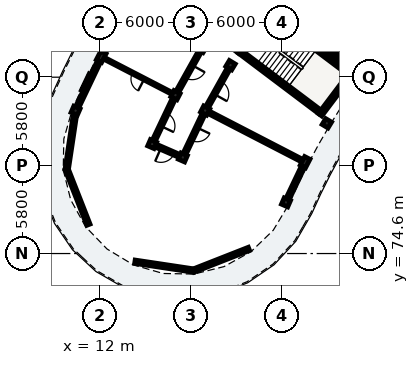
"""IFC4 building model, lengths in metres.
Left out: names, types, materials, properties, quantities, classifications, styles, units other than length and angle.
Written with IfcOpenShell. Run it as: python <this file> out.ifc"""

import sys

from ifc_helpers import new_model, si_unit, direction, frame, frame_2d, origin, origin_2d, place, context, subcontext, project, spatial, rectangle, extrude, element, fill, save


model = new_model("IFC4")
c1 = context("Model", 3, precision=1e-05, world=origin(), true_north=direction((0.0, 1.0)))
c2 = subcontext(c1, "Body", "Model", "MODEL_VIEW")
j1 = project(units=[si_unit("LENGTHUNIT", "METRE"), si_unit("PLANEANGLEUNIT", "RADIAN")], contexts=[c1])
p1 = place(None, origin())
s1 = spatial("IfcSite", under=j1, at=p1, CompositionType="ELEMENT")
p2 = place(p1, origin())
s2 = spatial("IfcBuilding", under=s1, at=p2, CompositionType="ELEMENT")
p3 = place(p2, frame((0.0, 0.0, 42.44)))
s3 = spatial("IfcBuildingStorey", under=s2, at=p3, CompositionType="ELEMENT", Elevation=42.44)
p4 = place(p3, frame((21.199, 87.897, 0.0), z_axis=(0.0, 0.0, 1.0), x_axis=(0.798639633744, -0.601809550782, 0.0)))
e1 = element("IfcWall", 1, at=p4, inside=s3, PredefinedType="SHEAR", context=c2, shape_type="SweptSolid", body=[
    extrude(rectangle(XDim=6.6, YDim=0.28, at=frame_2d((3.3, 0.0))), origin(), (0.0, 0.0, 1.0), 3.11),
])
for number, where, z_axis, x_axis in (
    (2, (26.497, 83.729, 0.0), (0.0, 0.0, 1.0), (0.602, 0.799, 0.0)),
    (3, (21.003, 87.87, 0.0), (0.0, 0.0, 1.0), (0.602, 0.799, 0.0)),
):
    element("IfcWall", number, at=place(p3, frame(where, z_axis=z_axis, x_axis=x_axis)), inside=s3, PredefinedType="SHEAR", context=c2, shape_type="SweptSolid", body=[
        extrude(rectangle(XDim=3.48, YDim=0.28, at=frame_2d((1.74, 0.0))), origin(), (0.0, 0.0, 1.0), 3.11),
    ])
p5 = place(p3, frame((23.125, 90.453, 0.0), z_axis=(0.0, 0.0, 1.0), x_axis=(0.798639633744, -0.601809550782, 0.0)))
e4 = element("IfcWall", 4, at=p5, inside=s3, PredefinedType="SHEAR", context=c2, shape_type="SweptSolid", body=[
    extrude(rectangle(XDim=6.6, YDim=0.28, at=frame_2d((3.3, 0.0))), origin(), (0.0, 0.0, 1.0), 3.11),
])
p6 = place(p5, frame((0.22, 0.0, 0.0)))
e5 = element("IfcOpeningElement", 5, at=p6, cuts=e4, PredefinedType="OPENING", context=c2, shape_type="SweptSolid", body=[
    extrude(rectangle(XDim=1.05, YDim=2.15, at=frame_2d((0.525, 1.075))), frame((0.0, 0.15, 0.0), z_axis=(0.0, -1.0, 0.0), x_axis=(1.0, 0.0, 0.0)), (0.0, 0.0, 1.0), 0.3),
])
p7 = place(p3, frame((26.455, 88.476, 0.0), z_axis=(0.0, 0.0, 1.0), x_axis=(0.798608971494, -0.601850239387, 0.0)))
e6 = element("IfcWall", 6, at=p7, inside=s3, PredefinedType="SHEAR", context=c2, shape_type="SweptSolid", body=[
    extrude(rectangle(XDim=2.7, YDim=0.23, at=frame_2d((1.35, 0.0))), origin(), (0.0, 0.0, 1.0), 3.11),
])
for number, where, z_axis, x_axis in (
    (7, (26.943, 83.167, 0.0), (0.0, 0.0, 1.0), (-0.856, 0.517, 0.0)),
    (8, (20.608, 86.991, 0.0), (0.0, 0.0, 1.0), (-0.856, 0.517, 0.0)),
    (9, (18.724, 88.128, 0.0), (0.0, 0.0, 1.0), (-0.856, 0.517, 0.0)),
):
    element("IfcColumn", number, at=place(p3, frame(where, z_axis=z_axis, x_axis=x_axis)), inside=s3, PredefinedType="COLUMN", context=c2, shape_type="SweptSolid", body=[
        extrude(rectangle(XDim=0.45, YDim=0.45, at=origin_2d()), origin(), (0.0, 0.0, 1.0), 3.12),
    ])
p8 = place(p3, frame((25.513, 80.61, 0.0), z_axis=(0.0, 0.0, 1.0), x_axis=(-0.888350277506, 0.459166401705, 0.0)))
e10 = element("IfcColumn", 10, at=p8, inside=s3, PredefinedType="PILASTER", context=c2, shape_type="SweptSolid", body=[
    extrude(rectangle(XDim=0.39, YDim=0.63, at=origin_2d()), origin(), (0.0, 0.0, 1.0), 3.12),
])
for number, where, z_axis, x_axis in (
    (11, (18.939, 84.008, 0.0), (0.0, 0.0, 1.0), (-0.888, 0.459, 0.0)),
    (12, (16.985, 85.018, 0.0), (0.0, 0.0, 1.0), (-0.888, 0.459, 0.0)),
):
    element("IfcColumn", number, at=place(p3, frame(where, z_axis=z_axis, x_axis=x_axis)), inside=s3, PredefinedType="COLUMN", context=c2, shape_type="SweptSolid", body=[
        extrude(rectangle(XDim=0.45, YDim=0.45, at=origin_2d()), origin(), (0.0, 0.0, 1.0), 3.12),
    ])
p9 = place(p3, frame((12.099, 87.543, 0.0), z_axis=(0.0, 0.0, 1.0), x_axis=(-0.888350277506, 0.459166401705, 0.0)))
e13 = element("IfcColumn", 13, at=p9, inside=s3, PredefinedType="PILASTER", context=c2, shape_type="SweptSolid", body=[
    extrude(rectangle(XDim=0.39, YDim=0.63, at=origin_2d()), origin(), (0.0, 0.0, 1.0), 3.12),
])
for number, where, z_axis, x_axis in (
    (14, (24.254, 77.964, 0.0), (0.0, 0.0, 1.0), (-0.917, 0.4, 0.0)),
    (15, (17.47, 80.921, 0.0), (0.0, 0.0, 1.0), (-0.917, 0.4, 0.0)),
    (16, (15.454, 81.801, 0.0), (0.0, 0.0, 1.0), (-0.917, 0.4, 0.0)),
    (17, (10.412, 83.999, 0.0), (0.0, 0.0, 1.0), (-0.917, 0.4, 0.0)),
):
    element("IfcColumn", number, at=place(p3, frame(where, z_axis=z_axis, x_axis=x_axis)), inside=s3, PredefinedType="COLUMN", context=c2, shape_type="SweptSolid", body=[
        extrude(rectangle(XDim=0.45, YDim=0.45, at=origin_2d()), origin(), (0.0, 0.0, 1.0), 3.12),
    ])
p10 = place(p3, frame((13.92, 90.799, 0.0), z_axis=(0.0, 0.0, 1.0), x_axis=(-0.488221804534, -0.872719582442, 0.0)))
e18 = element("IfcWall", 18, at=p10, inside=s3, PredefinedType="SOLIDWALL", context=c2, shape_type="SweptSolid", body=[
    extrude(rectangle(XDim=3.566, YDim=0.225, at=frame_2d((1.783, 0.0))), origin(), (0.0, 0.0, 1.0), 2.355),
])
p11 = place(p10, frame((1.043, 0.0, 0.55)))
e19 = element("IfcOpeningElement", 19, at=p11, cuts=e18, PredefinedType="OPENING", context=c2, shape_type="SweptSolid", body=[
    extrude(rectangle(XDim=1.48, YDim=1.62, at=frame_2d((0.74, 0.81))), frame((0.0, 0.123, 0.0), z_axis=(0.0, -1.0, 0.0), x_axis=(1.0, 0.0, 0.0)), (0.0, 0.0, 1.0), 0.245),
])
p12 = place(p3, frame((12.028, 87.394, 0.0), z_axis=(0.0, 0.0, 1.0), x_axis=(-0.429654487413, -0.902993367332, 0.0)))
e20 = element("IfcWall", 20, at=p12, inside=s3, PredefinedType="SOLIDWALL", context=c2, shape_type="SweptSolid", body=[
    extrude(rectangle(XDim=3.566, YDim=0.225, at=frame_2d((1.783, 0.0))), origin(), (0.0, 0.0, 1.0), 2.355),
])
p13 = place(p12, frame((1.183, 0.0, 0.55)))
e21 = element("IfcOpeningElement", 21, at=p13, cuts=e20, PredefinedType="OPENING", context=c2, shape_type="SweptSolid", body=[
    extrude(rectangle(XDim=1.2, YDim=1.51, at=frame_2d((0.6, 0.755))), frame((0.0, 0.123, 0.0), z_axis=(0.0, -1.0, 0.0), x_axis=(1.0, 0.0, 0.0)), (0.0, 0.0, 1.0), 0.245),
])
p14 = place(p3, frame((25.442, 80.461, 0.0), z_axis=(0.0, 0.0, 1.0), x_axis=(-0.429612784627, -0.90301320881, 0.0)))
e22 = element("IfcWall", 22, at=p14, inside=s3, PredefinedType="SOLIDWALL", context=c2, shape_type="SweptSolid", body=[
    extrude(rectangle(XDim=2.57, YDim=0.225, at=frame_2d((1.285, 0.0))), origin(), (0.0, 0.0, 1.0), 2.355),
])
p15 = place(p14, frame((0.545, 0.0, 0.55)))
e23 = element("IfcOpeningElement", 23, at=p15, cuts=e22, PredefinedType="OPENING", context=c2, shape_type="SweptSolid", body=[
    extrude(rectangle(XDim=1.48, YDim=1.46, at=frame_2d((0.74, 0.73))), frame((0.0, 0.123, 0.0), z_axis=(0.0, -1.0, 0.0), x_axis=(1.0, 0.0, 0.0)), (0.0, 0.0, 1.0), 0.245),
])
p16 = place(p3, frame((21.818, 74.908, 0.0), z_axis=(0.0, 0.0, 1.0), x_axis=(-0.930784898276, -0.365567330517, 0.0)))
e24 = element("IfcWall", 24, at=p16, inside=s3, PredefinedType="SOLIDWALL", context=c2, shape_type="SweptSolid", body=[
    extrude(rectangle(XDim=3.908, YDim=0.225, at=frame_2d((1.954, 0.0))), origin(), (0.0, 0.0, 1.0), 2.355),
])
p17 = place(p16, frame((0.979, 0.0, 0.4)))
e25 = element("IfcOpeningElement", 25, at=p17, cuts=e24, PredefinedType="OPENING", context=c2, shape_type="SweptSolid", body=[
    extrude(rectangle(XDim=1.95, YDim=1.78, at=frame_2d((0.975, 0.89))), frame((0.0, 0.123, 0.0), z_axis=(0.0, -1.0, 0.0), x_axis=(1.0, 0.0, 0.0)), (0.0, 0.0, 1.0), 0.245),
])
p18 = place(p3, frame((18.18, 73.479, 0.0), z_axis=(0.0, 0.0, 1.0), x_axis=(-0.988876706576, 0.148737551381, 0.0)))
e26 = element("IfcWall", 26, at=p18, inside=s3, PredefinedType="SOLIDWALL", context=c2, shape_type="SweptSolid", body=[
    extrude(rectangle(XDim=3.908, YDim=0.225, at=frame_2d((1.954, 0.0))), origin(), (0.0, 0.0, 1.0), 2.355),
])
p19 = place(p3, frame((11.26, 76.496, 0.0), z_axis=(0.0, 0.0, 1.0), x_axis=(-0.365567330517, 0.930784898276, 0.0)))
e27 = element("IfcWall", 27, at=p19, inside=s3, PredefinedType="SOLIDWALL", context=c2, shape_type="SweptSolid", body=[
    extrude(rectangle(XDim=3.908, YDim=0.225, at=frame_2d((1.954, 0.0))), origin(), (0.0, 0.0, 1.0), 2.355),
])
p20 = place(p19, frame((0.979, 0.0, 0.4)))
e28 = element("IfcOpeningElement", 28, at=p20, cuts=e27, PredefinedType="OPENING", context=c2, shape_type="SweptSolid", body=[
    extrude(rectangle(XDim=1.95, YDim=1.78, at=frame_2d((0.975, 0.89))), frame((0.0, 0.123, 0.0), z_axis=(0.0, -1.0, 0.0), x_axis=(1.0, 0.0, 0.0)), (0.0, 0.0, 1.0), 0.245),
])
p21 = place(p3, frame((9.831, 80.134, 0.0), z_axis=(0.0, 0.0, 1.0), x_axis=(0.148737551381, 0.988876706576, 0.0)))
e29 = element("IfcWall", 29, at=p21, inside=s3, PredefinedType="SOLIDWALL", context=c2, shape_type="SweptSolid", body=[
    extrude(rectangle(XDim=3.908, YDim=0.225, at=frame_2d((1.954, 0.0))), origin(), (0.0, 0.0, 1.0), 2.355),
])
p22 = place(p3, frame((18.553, 87.822, 0.0), z_axis=(0.0, 0.0, 1.0), x_axis=(-0.488211211273, -0.872725508501, 0.0)))
e30 = element("IfcWall", 30, at=p22, inside=s3, PredefinedType="PARTITIONING", context=c2, shape_type="SweptSolid", body=[
    extrude(rectangle(XDim=2.863, YDim=0.205, at=frame_2d((1.431, 0.0))), origin(), (0.0, 0.0, 1.0), 2.37),
])
p23 = place(p22, frame((0.957, 0.0, 0.0)))
e31 = element("IfcOpeningElement", 31, at=p23, cuts=e30, PredefinedType="OPENING", context=c2, shape_type="SweptSolid", body=[
    extrude(rectangle(XDim=0.95, YDim=2.13, at=frame_2d((0.475, 1.065))), frame((0.0, 0.113, 0.0), z_axis=(0.0, -1.0, 0.0), x_axis=(1.0, 0.0, 0.0)), (0.0, 0.0, 1.0), 0.225),
])
p24 = place(p3, frame((20.437, 86.685, 0.0), z_axis=(0.0, 0.0, 1.0), x_axis=(-0.48819576874, -0.872734147025, 0.0)))
e32 = element("IfcWall", 32, at=p24, inside=s3, PredefinedType="PARTITIONING", context=c2, shape_type="SweptSolid", body=[
    extrude(rectangle(XDim=2.718, YDim=0.205, at=frame_2d((1.359, 0.0))), origin(), (0.0, 0.0, 1.0), 2.37),
])
p25 = place(p24, frame((0.884, 0.0, 0.0)))
e33 = element("IfcOpeningElement", 33, at=p25, cuts=e32, PredefinedType="OPENING", context=c2, shape_type="SweptSolid", body=[
    extrude(rectangle(XDim=0.95, YDim=2.13, at=frame_2d((0.475, 1.065))), frame((0.0, 0.113, 0.0), z_axis=(0.0, -1.0, 0.0), x_axis=(1.0, 0.0, 0.0)), (0.0, 0.0, 1.0), 0.225),
])
p26 = place(p3, frame((16.629, 85.202, 0.0), z_axis=(0.0, 0.0, 1.0), x_axis=(-0.88836305433, 0.459141681512, 0.0)))
e34 = element("IfcWall", 34, at=p26, inside=s3, PredefinedType="PARTITIONING", context=c2, shape_type="SweptSolid", body=[
    extrude(rectangle(XDim=4.7, YDim=0.125, at=frame_2d((2.35, 0.0))), origin(), (0.0, 0.0, 1.0), 2.37),
])
p27 = place(p26, frame((1.915, 0.0, 0.0)))
e35 = element("IfcOpeningElement", 35, at=p27, cuts=e34, PredefinedType="OPENING", context=c2, shape_type="SweptSolid", body=[
    extrude(rectangle(XDim=0.87, YDim=2.08, at=frame_2d((0.435, 1.04))), frame((0.0, 0.073, 0.0), z_axis=(0.0, -1.0, 0.0), x_axis=(1.0, 0.0, 0.0)), (0.0, 0.0, 1.0), 0.145),
])
p28 = place(p3, frame((25.157, 80.794, 0.0), z_axis=(0.0, 0.0, 1.0), x_axis=(-0.888346696024, 0.459173330741, 0.0)))
e36 = element("IfcWall", 36, at=p28, inside=s3, PredefinedType="PARTITIONING", context=c2, shape_type="SweptSolid", body=[
    extrude(rectangle(XDim=6.6, YDim=0.185, at=frame_2d((3.3, 0.0))), origin(), (0.0, 0.0, 1.0), 2.37),
])
p29 = place(p3, frame((16.834, 84.702, 0.0), z_axis=(0.0, 0.0, 1.0), x_axis=(-0.429595933416, -0.90302122566, 0.0)))
e37 = element("IfcWall", 37, at=p29, inside=s3, PredefinedType="PARTITIONING", context=c2, shape_type="SweptSolid", body=[
    extrude(rectangle(XDim=2.863, YDim=0.205, at=frame_2d((1.432, 0.0))), origin(), (0.0, 0.0, 1.0), 2.37),
])
p30 = place(p29, frame((0.967, 0.0, 0.0)))
e38 = element("IfcOpeningElement", 38, at=p30, cuts=e37, PredefinedType="OPENING", context=c2, shape_type="SweptSolid", body=[
    extrude(rectangle(XDim=0.93, YDim=2.12, at=frame_2d((0.465, 1.06))), frame((0.0, 0.113, 0.0), z_axis=(0.0, -1.0, 0.0), x_axis=(1.0, 0.0, 0.0)), (0.0, 0.0, 1.0), 0.225),
])
p31 = place(p3, frame((18.789, 83.692, 0.0), z_axis=(0.0, 0.0, 1.0), x_axis=(-0.429630211913, -0.90300491749, 0.0)))
e39 = element("IfcWall", 39, at=p31, inside=s3, PredefinedType="PARTITIONING", context=c2, shape_type="SweptSolid", body=[
    extrude(rectangle(XDim=2.718, YDim=0.205, at=frame_2d((1.359, 0.0))), origin(), (0.0, 0.0, 1.0), 2.37),
])
p32 = place(p31, frame((0.894, 0.0, 0.0)))
e40 = element("IfcOpeningElement", 40, at=p32, cuts=e39, PredefinedType="OPENING", context=c2, shape_type="SweptSolid", body=[
    extrude(rectangle(XDim=0.93, YDim=2.12, at=frame_2d((0.465, 1.06))), frame((0.0, 0.113, 0.0), z_axis=(0.0, -1.0, 0.0), x_axis=(1.0, 0.0, 0.0)), (0.0, 0.0, 1.0), 0.225),
])
p33 = place(p3, frame((17.425, 80.941, 0.0), z_axis=(0.0, 0.0, 1.0), x_axis=(-0.916636986934, 0.399720695216, 0.0)))
e41 = element("IfcWall", 41, at=p33, inside=s3, PredefinedType="PARTITIONING", context=c2, shape_type="SweptSolid", body=[
    extrude(rectangle(XDim=2.1, YDim=0.205, at=frame_2d((1.05, 0.0))), origin(), (0.0, 0.0, 1.0), 2.37),
])
p34 = place(p33, frame((0.57, 0.0, 0.0)))
e42 = element("IfcOpeningElement", 42, at=p34, cuts=e41, PredefinedType="OPENING", context=c2, shape_type="SweptSolid", body=[
    extrude(rectangle(XDim=0.95, YDim=2.13, at=frame_2d((0.475, 1.065))), frame((0.0, 0.113, 0.0), z_axis=(0.0, -1.0, 0.0), x_axis=(1.0, 0.0, 0.0)), (0.0, 0.0, 1.0), 0.225),
])
p35 = place(p13, origin())
e43 = element("IfcWindow", 43, at=p35, inside=s3, PartitioningType="SINGLE_PANEL", PredefinedType="WINDOW", context=c2, shape_type="SweptSolid", body=[
    extrude(rectangle(XDim=1.2, YDim=1.51, at=frame_2d((0.6, 0.755))), frame((0.0, 0.03, 0.0), z_axis=(0.0, -1.0, 0.0), x_axis=(1.0, 0.0, 0.0)), (0.0, 0.0, 1.0), 0.06),
])
fill(e21, e43)
p36 = place(p15, origin())
e44 = element("IfcWindow", 44, at=p36, inside=s3, PartitioningType="SINGLE_PANEL", PredefinedType="WINDOW", context=c2, shape_type="SweptSolid", body=[
    extrude(rectangle(XDim=1.48, YDim=1.46, at=frame_2d((0.74, 0.73))), frame((0.0, 0.03, 0.0), z_axis=(0.0, -1.0, 0.0), x_axis=(1.0, 0.0, 0.0)), (0.0, 0.0, 1.0), 0.06),
])
fill(e23, e44)
p37 = place(p17, origin())
e45 = element("IfcWindow", 45, at=p37, inside=s3, PartitioningType="SINGLE_PANEL", PredefinedType="WINDOW", context=c2, shape_type="SweptSolid", body=[
    extrude(rectangle(XDim=1.95, YDim=1.78, at=frame_2d((0.975, 0.89))), frame((0.0, 0.03, 0.0), z_axis=(0.0, -1.0, 0.0), x_axis=(1.0, 0.0, 0.0)), (0.0, 0.0, 1.0), 0.06),
])
fill(e25, e45)
p38 = place(p20, origin())
e46 = element("IfcWindow", 46, at=p38, inside=s3, PartitioningType="SINGLE_PANEL", PredefinedType="WINDOW", context=c2, shape_type="SweptSolid", body=[
    extrude(rectangle(XDim=1.95, YDim=1.78, at=frame_2d((0.975, 0.89))), frame((0.0, 0.03, 0.0), z_axis=(0.0, -1.0, 0.0), x_axis=(1.0, 0.0, 0.0)), (0.0, 0.0, 1.0), 0.06),
])
fill(e28, e46)
p39 = place(p23, origin())
e47 = element("IfcDoor", 47, at=p39, inside=s3, OperationType="SINGLE_SWING_LEFT", PredefinedType="DOOR", context=c2, shape_type="SweptSolid", body=[
    extrude(rectangle(XDim=0.95, YDim=2.13, at=frame_2d((0.475, 1.065))), frame((0.0, 0.025, 0.0), z_axis=(0.0, -1.0, 0.0), x_axis=(1.0, 0.0, 0.0)), (0.0, 0.0, 1.0), 0.05),
])
fill(e31, e47)
p40 = place(p25, origin())
e48 = element("IfcDoor", 48, at=p40, inside=s3, OperationType="SINGLE_SWING_RIGHT", PredefinedType="DOOR", context=c2, shape_type="SweptSolid", body=[
    extrude(rectangle(XDim=0.95, YDim=2.13, at=frame_2d((0.475, 1.065))), frame((0.0, 0.025, 0.0), z_axis=(0.0, -1.0, 0.0), x_axis=(1.0, 0.0, 0.0)), (0.0, 0.0, 1.0), 0.05),
])
fill(e33, e48)
p41 = place(p27, origin())
e49 = element("IfcDoor", 49, at=p41, inside=s3, OperationType="SINGLE_SWING_LEFT", PredefinedType="DOOR", context=c2, shape_type="SweptSolid", body=[
    extrude(rectangle(XDim=0.87, YDim=2.08, at=frame_2d((0.435, 1.04))), frame((0.0, 0.025, 0.0), z_axis=(0.0, -1.0, 0.0), x_axis=(1.0, 0.0, 0.0)), (0.0, 0.0, 1.0), 0.05),
])
fill(e35, e49)
p42 = place(p30, origin())
e50 = element("IfcDoor", 50, at=p42, inside=s3, OperationType="SINGLE_SWING_RIGHT", PredefinedType="DOOR", context=c2, shape_type="SweptSolid", body=[
    extrude(rectangle(XDim=0.93, YDim=2.12, at=frame_2d((0.465, 1.06))), frame((0.0, 0.025, 0.0), z_axis=(0.0, -1.0, 0.0), x_axis=(1.0, 0.0, 0.0)), (0.0, 0.0, 1.0), 0.05),
])
fill(e38, e50)
p43 = place(p32, origin())
e51 = element("IfcDoor", 51, at=p43, inside=s3, OperationType="SINGLE_SWING_LEFT", PredefinedType="DOOR", context=c2, shape_type="SweptSolid", body=[
    extrude(rectangle(XDim=0.93, YDim=2.12, at=frame_2d((0.465, 1.06))), frame((0.0, 0.025, 0.0), z_axis=(0.0, -1.0, 0.0), x_axis=(1.0, 0.0, 0.0)), (0.0, 0.0, 1.0), 0.05),
])
fill(e40, e51)
p44 = place(p34, origin())
e52 = element("IfcDoor", 52, at=p44, inside=s3, OperationType="SINGLE_SWING_RIGHT", PredefinedType="DOOR", context=c2, shape_type="SweptSolid", body=[
    extrude(rectangle(XDim=0.95, YDim=2.13, at=frame_2d((0.475, 1.065))), frame((0.0, 0.025, 0.0), z_axis=(0.0, -1.0, 0.0), x_axis=(1.0, 0.0, 0.0)), (0.0, 0.0, 1.0), 0.05),
])
fill(e42, e52)
save(model, sys.argv[1])
